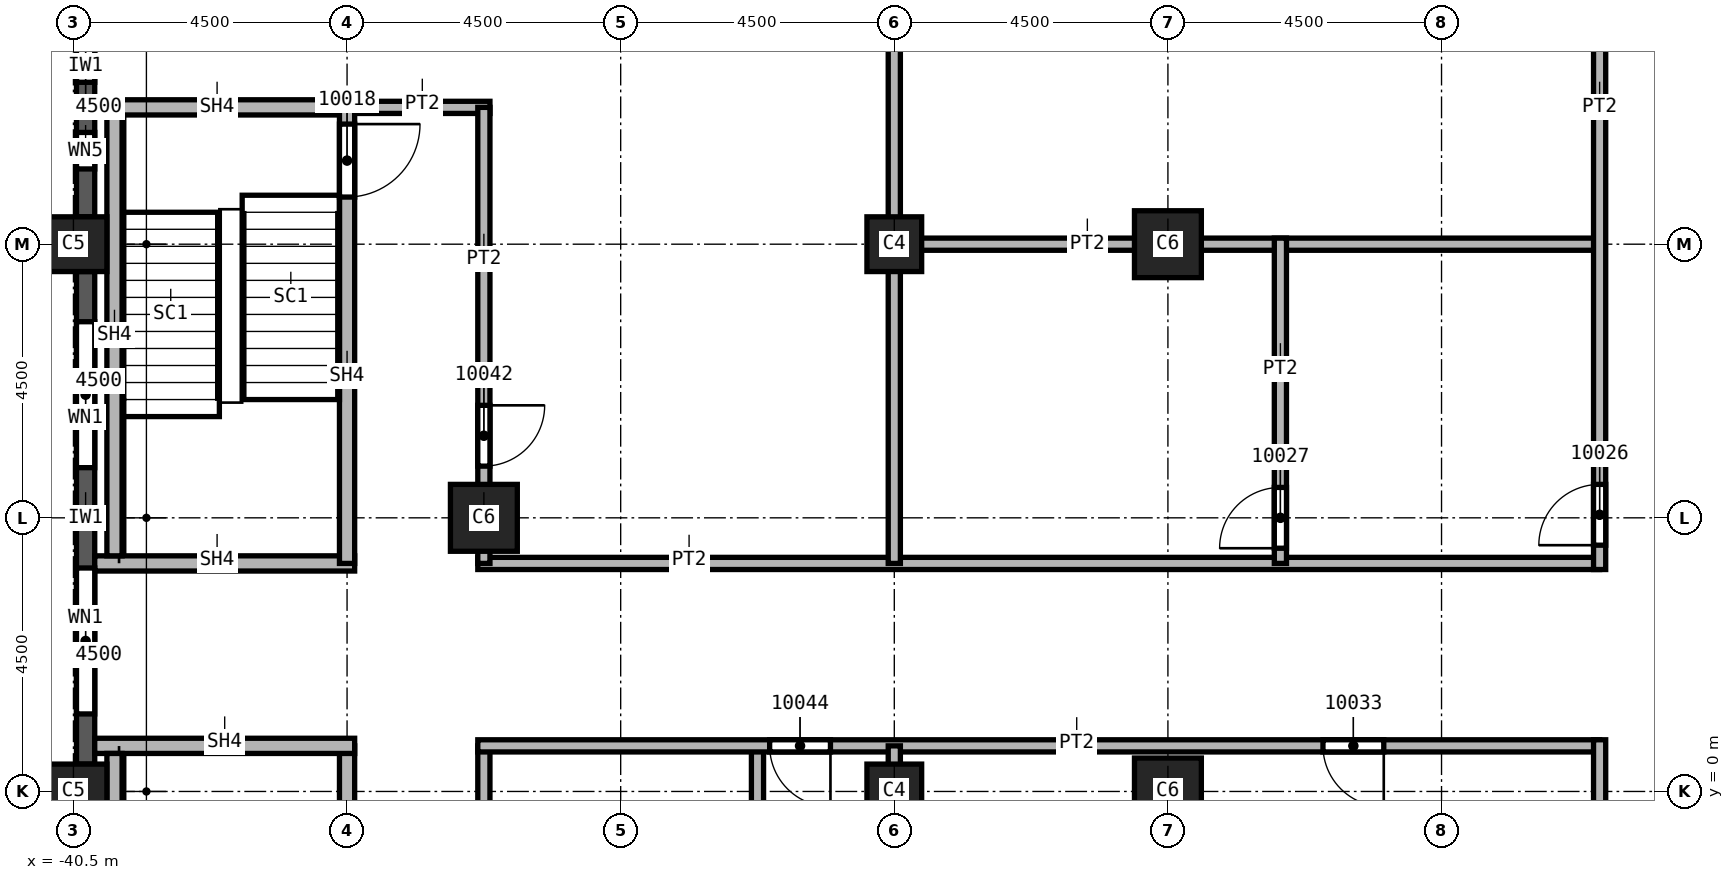
"""IFC4 building model, lengths in metres.
Left out: names, types, materials, properties, quantities, classifications, styles, units other than length and angle.
Written with IfcOpenShell. Run it as: python <this file> out.ifc"""

import sys

from ifc_helpers import new_model, si_unit, direction, frame, frame_2d, origin, origin_2d, place, context, subcontext, project, spatial, rectangle, extrude, element, fill, save


model = new_model("IFC4")
c1 = context("Model", 3, precision=1e-05, world=origin(), true_north=direction((0.0, 1.0)))
c2 = subcontext(c1, "Body", "Model", "MODEL_VIEW")
j1 = project(units=[si_unit("LENGTHUNIT", "METRE"), si_unit("PLANEANGLEUNIT", "RADIAN")], contexts=[c1])
p1 = place(None, origin())
s1 = spatial("IfcSite", under=j1, at=p1, CompositionType="ELEMENT")
p2 = place(p1, origin())
s2 = spatial("IfcBuilding", under=s1, at=p2, CompositionType="ELEMENT")
p3 = place(p2, frame((0.0, 0.0, 174.0)))
s3 = spatial("IfcBuildingStorey", under=s2, at=p3, CompositionType="ELEMENT", Elevation=174.0)
for number, where, z_axis, x_axis in (
    (1, (-40.5, 0.0, 0.0), (0.0, 0.0, 1.0), (0.0, 1.0, 0.0)),
    (2, (-40.5, 9.0, 0.0), (0.0, 0.0, 1.0), (0.0, 1.0, 0.0)),
):
    element("IfcColumn", number, at=place(p3, frame(where, z_axis=z_axis, x_axis=x_axis)), inside=s3, PredefinedType="COLUMN", context=c2, shape_type="SweptSolid", body=[
        extrude(rectangle(XDim=0.9, YDim=1.1, at=origin_2d()), origin(), (0.0, 0.0, 1.0), 3.59),
    ])
for number, where, z_axis, x_axis in (
    (3, (-33.75, 4.5, 0.0), (0.0, 0.0, 1.0), (1.0, 0.0, 0.0)),
    (4, (-22.5, 0.0, 0.0), (0.0, 0.0, 1.0), (1.0, 0.0, 0.0)),
    (5, (-22.5, 9.0, 0.0), (0.0, 0.0, 1.0), (1.0, 0.0, 0.0)),
):
    element("IfcColumn", number, at=place(p3, frame(where, z_axis=z_axis, x_axis=x_axis)), inside=s3, PredefinedType="COLUMN", context=c2, shape_type="SweptSolid", body=[
        extrude(rectangle(XDim=1.1, YDim=1.1, at=origin_2d()), origin(), (0.0, 0.0, 1.0), 3.59),
    ])
for number, where, z_axis, x_axis in (
    (6, (-27.0, 0.0, 0.0), (0.0, 0.0, 1.0), (1.0, 0.0, 0.0)),
    (7, (-27.0, 9.0, 0.0), (0.0, 0.0, 1.0), (1.0, 0.0, 0.0)),
):
    element("IfcColumn", number, at=place(p3, frame(where, z_axis=z_axis, x_axis=x_axis)), inside=s3, PredefinedType="COLUMN", context=c2, shape_type="SweptSolid", body=[
        extrude(rectangle(XDim=0.9, YDim=0.9, at=origin_2d()), origin(), (0.0, 0.0, 1.0), 3.59),
    ])
p4 = place(p3, frame((-40.3, 13.05, 0.0), z_axis=(0.0, 0.0, 1.0), x_axis=(0.0, -1.0, 0.0)))
e8 = element("IfcWall", 8, at=p4, inside=s3, PredefinedType="SOLIDWALL", context=c2, shape_type="SweptSolid", body=[
    extrude(rectangle(XDim=3.6, YDim=0.3, at=frame_2d((1.8, 0.0))), origin(), (0.0, 0.0, 1.0), 2.99),
])
p5 = place(p4, frame((0.788, 0.0, 0.8)))
e9 = element("IfcOpeningElement", 9, at=p5, cuts=e8, PredefinedType="OPENING", context=c2, shape_type="SweptSolid", body=[
    extrude(rectangle(XDim=0.6, YDim=1.95, at=frame_2d((0.3, 0.975))), frame((0.0, 0.15, 0.0), z_axis=(0.0, -1.0, 0.0), x_axis=(1.0, 0.0, 0.0)), (0.0, 0.0, 1.0), 0.3),
])
p6 = place(p4, frame((2.212, 0.0, 0.8)))
e10 = element("IfcOpeningElement", 10, at=p6, cuts=e8, PredefinedType="OPENING", context=c2, shape_type="SweptSolid", body=[
    extrude(rectangle(XDim=0.6, YDim=1.95, at=frame_2d((0.3, 0.975))), frame((0.0, 0.15, 0.0), z_axis=(0.0, -1.0, 0.0), x_axis=(1.0, 0.0, 0.0)), (0.0, 0.0, 1.0), 0.3),
])
p7 = place(p3, frame((-40.3, 8.55, 0.0), z_axis=(0.0, 0.0, 1.0), x_axis=(0.0, -1.0, 0.0)))
e11 = element("IfcWall", 11, at=p7, inside=s3, PredefinedType="SOLIDWALL", context=c2, shape_type="SweptSolid", body=[
    extrude(rectangle(XDim=8.1, YDim=0.3, at=frame_2d((4.05, 0.0))), origin(), (0.0, 0.0, 1.0), 2.99),
])
p8 = place(p7, frame((0.825, 0.0, 0.8)))
e12 = element("IfcOpeningElement", 12, at=p8, cuts=e11, PredefinedType="OPENING", context=c2, shape_type="SweptSolid", body=[
    extrude(rectangle(XDim=2.4, YDim=1.95, at=frame_2d((1.2, 0.975))), frame((0.0, 0.15, 0.0), z_axis=(0.0, -1.0, 0.0), x_axis=(1.0, 0.0, 0.0)), (0.0, 0.0, 1.0), 0.3),
])
p9 = place(p7, frame((4.875, 0.0, 0.8)))
e13 = element("IfcOpeningElement", 13, at=p9, cuts=e11, PredefinedType="OPENING", context=c2, shape_type="SweptSolid", body=[
    extrude(rectangle(XDim=2.4, YDim=1.95, at=frame_2d((1.2, 0.975))), frame((0.0, 0.15, 0.0), z_axis=(0.0, -1.0, 0.0), x_axis=(1.0, 0.0, 0.0)), (0.0, 0.0, 1.0), 0.3),
])
p10 = place(p3, frame((-36.0, 11.25, 0.0), z_axis=(0.0, 0.0, 1.0), x_axis=(1.0, 0.0, 0.0)))
e14 = element("IfcWall", 14, at=p10, inside=s3, PredefinedType="PARTITIONING", context=c2, shape_type="SweptSolid", body=[
    extrude(rectangle(XDim=2.35, YDim=0.2, at=frame_2d((1.175, 0.0))), origin(), (0.0, 0.0, 1.0), 3.59),
])
p11 = place(p3, frame((-33.85, 3.75, 0.0), z_axis=(0.0, 0.0, 1.0), x_axis=(1.0, 0.0, 0.0)))
e15 = element("IfcWall", 15, at=p11, inside=s3, PredefinedType="PARTITIONING", context=c2, shape_type="SweptSolid", body=[
    extrude(rectangle(XDim=18.45, YDim=0.2, at=frame_2d((9.225, 0.0))), origin(), (0.0, 0.0, 1.0), 3.59),
])
p12 = place(p3, frame((-33.75, 0.75, 0.0), z_axis=(0.0, 0.0, 1.0), x_axis=(0.0, -1.0, 0.0)))
e16 = element("IfcWall", 16, at=p12, inside=s3, PredefinedType="PARTITIONING", context=c2, shape_type="SweptSolid", body=[
    extrude(rectangle(XDim=7.6, YDim=0.2, at=frame_2d((3.8, 0.0))), origin(), (0.0, 0.0, 1.0), 3.59),
])
p13 = place(p12, frame((6.1, 0.0, 0.0)))
e17 = element("IfcOpeningElement", 17, at=p13, cuts=e16, PredefinedType="OPENING", context=c2, shape_type="SweptSolid", body=[
    extrude(rectangle(XDim=1.0, YDim=2.1, at=frame_2d((0.5, 1.05))), frame((0.0, 0.1, 0.0), z_axis=(0.0, -1.0, 0.0), x_axis=(1.0, 0.0, 0.0)), (0.0, 0.0, 1.0), 0.2),
])
p14 = place(p3, frame((-33.75, 11.25, 0.0), z_axis=(0.0, 0.0, 1.0), x_axis=(0.0, -1.0, 0.0)))
e18 = element("IfcWall", 18, at=p14, inside=s3, PredefinedType="PARTITIONING", context=c2, shape_type="SweptSolid", body=[
    extrude(rectangle(XDim=7.5, YDim=0.2, at=frame_2d((3.75, 0.0))), origin(), (0.0, 0.0, 1.0), 3.59),
])
p15 = place(p14, frame((4.9, 0.0, 0.0)))
e19 = element("IfcOpeningElement", 19, at=p15, cuts=e18, PredefinedType="OPENING", context=c2, shape_type="SweptSolid", body=[
    extrude(rectangle(XDim=1.0, YDim=2.1, at=frame_2d((0.5, 1.05))), frame((0.0, 0.1, 0.0), z_axis=(0.0, -1.0, 0.0), x_axis=(1.0, 0.0, 0.0)), (0.0, 0.0, 1.0), 0.2),
])
p16 = place(p3, frame((-29.25, 0.75, 0.0), z_axis=(0.0, 0.0, 1.0), x_axis=(0.0, -1.0, 0.0)))
e20 = element("IfcWall", 20, at=p16, inside=s3, PredefinedType="PARTITIONING", context=c2, shape_type="SweptSolid", body=[
    extrude(rectangle(XDim=18.4, YDim=0.2, at=frame_2d((9.2, 0.0))), origin(), (0.0, 0.0, 1.0), 3.59),
])
p17 = place(p3, frame((-15.4, 0.75, 0.0), z_axis=(0.0, 0.0, 1.0), x_axis=(-1.0, 0.0, 0.0)))
e21 = element("IfcWall", 21, at=p17, inside=s3, PredefinedType="PARTITIONING", context=c2, shape_type="SweptSolid", body=[
    extrude(rectangle(XDim=18.45, YDim=0.2, at=frame_2d((9.225, 0.0))), origin(), (0.0, 0.0, 1.0), 3.59),
])
p18 = place(p17, frame((3.55, 0.0, 0.0)))
e22 = element("IfcOpeningElement", 22, at=p18, cuts=e21, PredefinedType="OPENING", context=c2, shape_type="SweptSolid", body=[
    extrude(rectangle(XDim=1.0, YDim=2.1, at=frame_2d((0.5, 1.05))), frame((0.0, 0.1, 0.0), z_axis=(0.0, -1.0, 0.0), x_axis=(1.0, 0.0, 0.0)), (0.0, 0.0, 1.0), 0.2),
])
p19 = place(p17, frame((12.65, 0.0, 0.0)))
e23 = element("IfcOpeningElement", 23, at=p19, cuts=e21, PredefinedType="OPENING", context=c2, shape_type="SweptSolid", body=[
    extrude(rectangle(XDim=1.0, YDim=2.1, at=frame_2d((0.5, 1.05))), frame((0.0, 0.1, 0.0), z_axis=(0.0, -1.0, 0.0), x_axis=(1.0, 0.0, 0.0)), (0.0, 0.0, 1.0), 0.2),
])
p20 = place(p3, frame((-27.1, 9.0, 0.0), z_axis=(0.0, 0.0, 1.0), x_axis=(1.0, 0.0, 0.0)))
e24 = element("IfcWall", 24, at=p20, inside=s3, PredefinedType="PARTITIONING", context=c2, shape_type="SweptSolid", body=[
    extrude(rectangle(XDim=11.7, YDim=0.2, at=frame_2d((5.85, 0.0))), origin(), (0.0, 0.0, 1.0), 3.59),
])
p21 = place(p3, frame((-27.0, -17.45, 0.0), z_axis=(0.0, 0.0, 1.0), x_axis=(0.0, 1.0, 0.0)))
e25 = element("IfcWall", 25, at=p21, inside=s3, PredefinedType="PARTITIONING", context=c2, shape_type="SweptSolid", body=[
    extrude(rectangle(XDim=18.2, YDim=0.2, at=frame_2d((9.1, 0.0))), origin(), (0.0, 0.0, 1.0), 3.59),
])
p22 = place(p3, frame((-27.0, 3.75, 0.0), z_axis=(0.0, 0.0, 1.0), x_axis=(0.0, 1.0, 0.0)))
e26 = element("IfcWall", 26, at=p22, inside=s3, PredefinedType="PARTITIONING", context=c2, shape_type="SweptSolid", body=[
    extrude(rectangle(XDim=13.7, YDim=0.2, at=frame_2d((6.85, 0.0))), origin(), (0.0, 0.0, 1.0), 3.59),
])
p23 = place(p3, frame((-20.65, 3.75, 0.0), z_axis=(0.0, 0.0, 1.0), x_axis=(0.0, 1.0, 0.0)))
e27 = element("IfcWall", 27, at=p23, inside=s3, PredefinedType="PARTITIONING", context=c2, shape_type="SweptSolid", body=[
    extrude(rectangle(XDim=5.35, YDim=0.2, at=frame_2d((2.675, 0.0))), origin(), (0.0, 0.0, 1.0), 3.59),
])
p24 = place(p23, frame((0.25, 0.0, 0.0)))
e28 = element("IfcOpeningElement", 28, at=p24, cuts=e27, PredefinedType="OPENING", context=c2, shape_type="SweptSolid", body=[
    extrude(rectangle(XDim=1.0, YDim=2.1, at=frame_2d((0.5, 1.05))), frame((0.0, 0.1, 0.0), z_axis=(0.0, -1.0, 0.0), x_axis=(1.0, 0.0, 0.0)), (0.0, 0.0, 1.0), 0.2),
])
p25 = place(p3, frame((-15.4, -23.25, 0.0), z_axis=(0.0, 0.0, 1.0), x_axis=(0.0, 1.0, 0.0)))
e29 = element("IfcWall", 29, at=p25, inside=s3, PredefinedType="PARTITIONING", context=c2, shape_type="SweptSolid", body=[
    extrude(rectangle(XDim=24.1, YDim=0.2, at=frame_2d((12.05, 0.0))), origin(), (0.0, 0.0, 1.0), 3.59),
])
p26 = place(p25, frame((4.0, 0.0, 0.0)))
e30 = element("IfcOpeningElement", 30, at=p26, cuts=e29, PredefinedType="OPENING", context=c2, shape_type="SweptSolid", body=[
    extrude(rectangle(XDim=1.0, YDim=2.1, at=frame_2d((0.5, 1.05))), frame((0.0, 0.1, 0.0), z_axis=(0.0, -1.0, 0.0), x_axis=(1.0, 0.0, 0.0)), (0.0, 0.0, 1.0), 0.2),
])
p27 = place(p25, frame((10.2, 0.0, 0.0)))
e31 = element("IfcOpeningElement", 31, at=p27, cuts=e29, PredefinedType="OPENING", context=c2, shape_type="SweptSolid", body=[
    extrude(rectangle(XDim=1.0, YDim=2.1, at=frame_2d((0.5, 1.05))), frame((0.0, 0.1, 0.0), z_axis=(0.0, -1.0, 0.0), x_axis=(1.0, 0.0, 0.0)), (0.0, 0.0, 1.0), 0.2),
])
p28 = place(p25, frame((15.15, 0.0, 0.0)))
e32 = element("IfcOpeningElement", 32, at=p28, cuts=e29, PredefinedType="OPENING", context=c2, shape_type="SweptSolid", body=[
    extrude(rectangle(XDim=1.0, YDim=2.1, at=frame_2d((0.5, 1.05))), frame((0.0, 0.1, 0.0), z_axis=(0.0, -1.0, 0.0), x_axis=(1.0, 0.0, 0.0)), (0.0, 0.0, 1.0), 0.2),
])
p29 = place(p3, frame((-15.4, 3.65, 0.0), z_axis=(0.0, 0.0, 1.0), x_axis=(0.0, 1.0, 0.0)))
e33 = element("IfcWall", 33, at=p29, inside=s3, PredefinedType="PARTITIONING", context=c2, shape_type="SweptSolid", body=[
    extrude(rectangle(XDim=9.95, YDim=0.2, at=frame_2d((4.975, 0.0))), origin(), (0.0, 0.0, 1.0), 3.59),
])
p30 = place(p29, frame((0.4, 0.0, 0.0)))
e34 = element("IfcOpeningElement", 34, at=p30, cuts=e33, PredefinedType="OPENING", context=c2, shape_type="SweptSolid", body=[
    extrude(rectangle(XDim=1.0, YDim=2.1, at=frame_2d((0.5, 1.05))), frame((0.0, 0.1, 0.0), z_axis=(0.0, -1.0, 0.0), x_axis=(1.0, 0.0, 0.0)), (0.0, 0.0, 1.0), 0.2),
])
p31 = place(p3, frame((-40.15, 3.75, 0.0), z_axis=(0.0, 0.0, 1.0), x_axis=(1.0, 0.0, 0.0)))
e35 = element("IfcWall", 35, at=p31, inside=s3, PredefinedType="SOLIDWALL", context=c2, shape_type="SweptSolid", body=[
    extrude(rectangle(XDim=4.275, YDim=0.25, at=frame_2d((2.137, 0.0))), origin(), (0.0, 0.0, 1.0), 3.59),
])
p32 = place(p3, frame((-40.15, 11.25, 0.0), z_axis=(0.0, 0.0, 1.0), x_axis=(1.0, 0.0, 0.0)))
e36 = element("IfcWall", 36, at=p32, inside=s3, PredefinedType="SOLIDWALL", context=c2, shape_type="SweptSolid", body=[
    extrude(rectangle(XDim=4.15, YDim=0.25, at=frame_2d((2.075, 0.0))), origin(), (0.0, 0.0, 1.0), 3.59),
])
p33 = place(p3, frame((-36.0, 0.75, 0.0), z_axis=(0.0, 0.0, 1.0), x_axis=(0.0, -1.0, 0.0)))
e37 = element("IfcWall", 37, at=p33, inside=s3, PredefinedType="SOLIDWALL", context=c2, shape_type="SweptSolid", body=[
    extrude(rectangle(XDim=7.625, YDim=0.25, at=frame_2d((3.812, 0.0))), origin(), (0.0, 0.0, 1.0), 3.59),
])
p34 = place(p33, frame((5.95, 0.0, 0.0)))
e38 = element("IfcOpeningElement", 38, at=p34, cuts=e37, PredefinedType="OPENING", context=c2, shape_type="SweptSolid", body=[
    extrude(rectangle(XDim=1.2, YDim=2.1, at=frame_2d((0.6, 1.05))), frame((0.0, 0.125, 0.0), z_axis=(0.0, -1.0, 0.0), x_axis=(1.0, 0.0, 0.0)), (0.0, 0.0, 1.0), 0.25),
])
p35 = place(p3, frame((-36.0, 11.375, 0.0), z_axis=(0.0, 0.0, 1.0), x_axis=(0.0, -1.0, 0.0)))
e39 = element("IfcWall", 39, at=p35, inside=s3, PredefinedType="SOLIDWALL", context=c2, shape_type="SweptSolid", body=[
    extrude(rectangle(XDim=7.625, YDim=0.25, at=frame_2d((3.812, 0.0))), origin(), (0.0, 0.0, 1.0), 3.59),
])
p36 = place(p35, frame((0.4, 0.0, 0.0)))
e40 = element("IfcOpeningElement", 40, at=p36, cuts=e39, PredefinedType="OPENING", context=c2, shape_type="SweptSolid", body=[
    extrude(rectangle(XDim=1.2, YDim=2.1, at=frame_2d((0.6, 1.05))), frame((0.0, 0.125, 0.0), z_axis=(0.0, -1.0, 0.0), x_axis=(1.0, 0.0, 0.0)), (0.0, 0.0, 1.0), 0.25),
])
p37 = place(p3, frame((-35.875, 0.75, 0.0), z_axis=(0.0, 0.0, 1.0), x_axis=(-1.0, 0.0, 0.0)))
e41 = element("IfcWall", 41, at=p37, inside=s3, PredefinedType="SOLIDWALL", context=c2, shape_type="SweptSolid", body=[
    extrude(rectangle(XDim=4.275, YDim=0.25, at=frame_2d((2.137, 0.0))), origin(), (0.0, 0.0, 1.0), 3.59),
])
for number, where, z_axis, x_axis in (
    (42, (-39.825, 3.875, 0.0), (0.0, 0.0, 1.0), (0.0, 1.0, 0.0)),
    (43, (-39.825, -6.625, 0.0), (0.0, 0.0, 1.0), (0.0, 1.0, 0.0)),
):
    element("IfcWall", number, at=place(p3, frame(where, z_axis=z_axis, x_axis=x_axis)), inside=s3, PredefinedType="SOLIDWALL", context=c2, shape_type="SweptSolid", body=[
        extrude(rectangle(XDim=7.25, YDim=0.25, at=frame_2d((3.625, 0.0))), origin(), (0.0, 0.0, 1.0), 3.59),
    ])
p38 = place(p8, origin())
e44 = element("IfcWindow", 44, at=p38, inside=s3, PartitioningType="SINGLE_PANEL", PredefinedType="WINDOW", context=c2, shape_type="SweptSolid", body=[
    extrude(rectangle(XDim=2.4, YDim=1.95, at=frame_2d((1.2, 0.975))), frame((0.0, 0.03, 0.0), z_axis=(0.0, -1.0, 0.0), x_axis=(1.0, 0.0, 0.0)), (0.0, 0.0, 1.0), 0.06),
])
fill(e12, e44)
p39 = place(p9, origin())
e45 = element("IfcWindow", 45, at=p39, inside=s3, PartitioningType="SINGLE_PANEL", PredefinedType="WINDOW", context=c2, shape_type="SweptSolid", body=[
    extrude(rectangle(XDim=2.4, YDim=1.95, at=frame_2d((1.2, 0.975))), frame((0.0, 0.03, 0.0), z_axis=(0.0, -1.0, 0.0), x_axis=(1.0, 0.0, 0.0)), (0.0, 0.0, 1.0), 0.06),
])
fill(e13, e45)
p40 = place(p36, origin())
e46 = element("IfcDoor", 46, at=p40, inside=s3, OperationType="SINGLE_SWING_LEFT", PredefinedType="DOOR", context=c2, shape_type="SweptSolid", body=[
    extrude(rectangle(XDim=1.2, YDim=2.1, at=frame_2d((0.6, 1.05))), frame((0.0, 0.025, 0.0), z_axis=(0.0, -1.0, 0.0), x_axis=(1.0, 0.0, 0.0)), (0.0, 0.0, 1.0), 0.05),
])
fill(e40, e46)
p41 = place(p30, origin())
e47 = element("IfcDoor", 47, at=p41, inside=s3, OperationType="SINGLE_SWING_LEFT", PredefinedType="DOOR", context=c2, shape_type="SweptSolid", body=[
    extrude(rectangle(XDim=1.0, YDim=2.1, at=frame_2d((0.5, 1.05))), frame((0.0, 0.025, 0.0), z_axis=(0.0, -1.0, 0.0), x_axis=(1.0, 0.0, 0.0)), (0.0, 0.0, 1.0), 0.05),
])
fill(e34, e47)
p42 = place(p24, origin())
e48 = element("IfcDoor", 48, at=p42, inside=s3, OperationType="SINGLE_SWING_RIGHT", PredefinedType="DOOR", context=c2, shape_type="SweptSolid", body=[
    extrude(rectangle(XDim=1.0, YDim=2.1, at=frame_2d((0.5, 1.05))), frame((0.0, 0.025, 0.0), z_axis=(0.0, -1.0, 0.0), x_axis=(1.0, 0.0, 0.0)), (0.0, 0.0, 1.0), 0.05),
])
fill(e28, e48)
p43 = place(p18, origin())
e49 = element("IfcDoor", 49, at=p43, inside=s3, OperationType="SINGLE_SWING_RIGHT", PredefinedType="DOOR", context=c2, shape_type="SweptSolid", body=[
    extrude(rectangle(XDim=1.0, YDim=2.1, at=frame_2d((0.5, 1.05))), frame((0.0, 0.025, 0.0), z_axis=(0.0, -1.0, 0.0), x_axis=(1.0, 0.0, 0.0)), (0.0, 0.0, 1.0), 0.05),
])
fill(e22, e49)
p44 = place(p15, origin())
e50 = element("IfcDoor", 50, at=p44, inside=s3, OperationType="SINGLE_SWING_LEFT", PredefinedType="DOOR", context=c2, shape_type="SweptSolid", body=[
    extrude(rectangle(XDim=1.0, YDim=2.1, at=frame_2d((0.5, 1.05))), frame((0.0, 0.025, 0.0), z_axis=(0.0, -1.0, 0.0), x_axis=(1.0, 0.0, 0.0)), (0.0, 0.0, 1.0), 0.05),
])
fill(e19, e50)
p45 = place(p19, origin())
e51 = element("IfcDoor", 51, at=p45, inside=s3, OperationType="SINGLE_SWING_LEFT", PredefinedType="DOOR", context=c2, shape_type="SweptSolid", body=[
    extrude(rectangle(XDim=1.0, YDim=2.1, at=frame_2d((0.5, 1.05))), frame((0.0, 0.025, 0.0), z_axis=(0.0, -1.0, 0.0), x_axis=(1.0, 0.0, 0.0)), (0.0, 0.0, 1.0), 0.05),
])
fill(e23, e51)
p46 = place(p5, origin())
e52 = element("IfcWindow", 52, at=p46, inside=s3, PartitioningType="SINGLE_PANEL", PredefinedType="WINDOW", context=c2, shape_type="SweptSolid", body=[
    extrude(rectangle(XDim=0.6, YDim=1.95, at=frame_2d((0.3, 0.975))), frame((0.0, 0.03, 0.0), z_axis=(0.0, -1.0, 0.0), x_axis=(1.0, 0.0, 0.0)), (0.0, 0.0, 1.0), 0.06),
])
fill(e9, e52)
p47 = place(p6, origin())
e53 = element("IfcWindow", 53, at=p47, inside=s3, PartitioningType="SINGLE_PANEL", PredefinedType="WINDOW", context=c2, shape_type="SweptSolid", body=[
    extrude(rectangle(XDim=0.6, YDim=1.95, at=frame_2d((0.3, 0.975))), frame((0.0, 0.03, 0.0), z_axis=(0.0, -1.0, 0.0), x_axis=(1.0, 0.0, 0.0)), (0.0, 0.0, 1.0), 0.06),
])
fill(e10, e53)
save(model, sys.argv[1])
